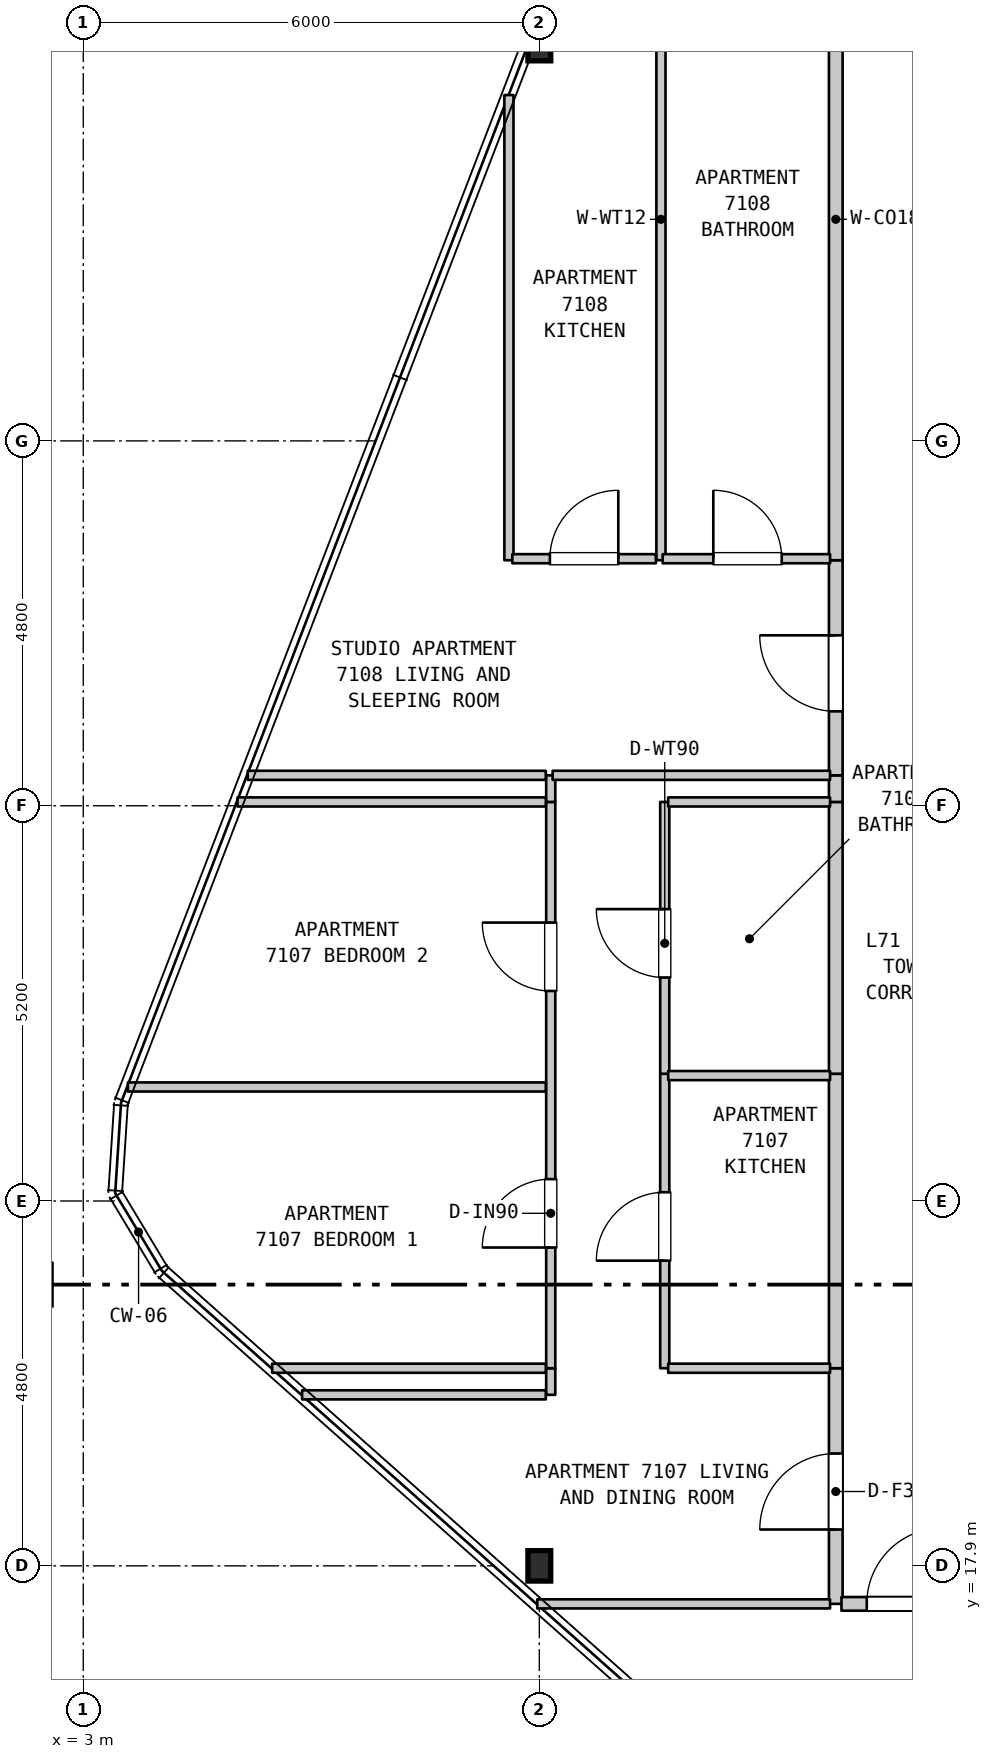
"""IFC4 building model, lengths in metres.
Left out: names, types, materials, properties, quantities, classifications, styles, units other than length and angle.
Written with IfcOpenShell. Run it as: python <this file> out.ifc"""

import sys

from ifc_helpers import new_model, si_unit, direction, frame, frame_2d, origin, origin_2d, place, context, subcontext, project, spatial, rectangle, i_section, extrude, element, fill, save


model = new_model("IFC4")
c1 = context("Model", 3, precision=1e-05, world=origin(), true_north=direction((0.0, 1.0)))
c2 = subcontext(c1, "Body", "Model", "MODEL_VIEW")
j1 = project(units=[si_unit("LENGTHUNIT", "METRE"), si_unit("PLANEANGLEUNIT", "RADIAN")], contexts=[c1])
p1 = place(None, origin())
s1 = spatial("IfcSite", under=j1, at=p1, CompositionType="ELEMENT")
p2 = place(p1, origin())
s2 = spatial("IfcBuilding", under=s1, at=p2, CompositionType="ELEMENT")
p3 = place(p2, frame((0.0, 0.0, 284.3)))
s3 = spatial("IfcBuildingStorey", under=s2, at=p3, CompositionType="ELEMENT", Elevation=284.3)
for number, where, z_axis, x_axis in (
    (1, (9.0, 17.9, 0.0), (0.0, 0.0, 1.0), (1.0, 0.0, 0.0)),
    (2, (9.0, 37.9, 0.0), (0.0, 0.0, 1.0), (1.0, 0.0, 0.0)),
):
    element("IfcColumn", number, at=place(p3, frame(where, z_axis=z_axis, x_axis=x_axis)), inside=s3, PredefinedType="COLUMN", context=c2, shape_type="SweptSolid", body=[
        extrude(i_section(OverallWidth=0.3, OverallDepth=0.4, WebThickness=0.013, FlangeThickness=0.024, FilletRadius=0.027, at=origin_2d()), origin(), (0.0, 0.0, 1.0), 3.7),
    ])
p4 = place(p3, frame((8.6, 31.13, 0.0), z_axis=(0.0, 0.0, 1.0), x_axis=(0.0, 1.0, 0.0)))
e3 = element("IfcWall", 3, at=p4, inside=s3, PredefinedType="PARTITIONING", context=c2, shape_type="SweptSolid", body=[
    extrude(rectangle(XDim=6.12, YDim=0.12, at=frame_2d((3.06, 0.0))), origin(), (0.0, 0.0, 1.0), 3.39),
])
p5 = place(p3, frame((9.15, 20.15, 0.0), z_axis=(0.0, 0.0, 1.0), x_axis=(0.0, 1.0, 0.0)))
e4 = element("IfcWall", 4, at=p5, inside=s3, PredefinedType="PARTITIONING", context=c2, shape_type="SweptSolid", body=[
    extrude(rectangle(XDim=0.35, YDim=0.12, at=frame_2d((0.175, 0.0))), origin(), (0.0, 0.0, 1.0), 3.39),
])
p6 = place(p3, frame((9.15, 20.5, 0.0), z_axis=(0.0, 0.0, 1.0), x_axis=(0.0, 1.0, 0.0)))
e5 = element("IfcWall", 5, at=p6, inside=s3, PredefinedType="PARTITIONING", context=c2, shape_type="SweptSolid", body=[
    extrude(rectangle(XDim=7.45, YDim=0.12, at=frame_2d((3.725, 0.0))), origin(), (0.0, 0.0, 1.0), 2.79),
])
p7 = place(p6, frame((1.588, 0.0, 0.0)))
e6 = element("IfcOpeningElement", 6, at=p7, cuts=e5, PredefinedType="OPENING", context=c2, shape_type="SweptSolid", body=[
    extrude(rectangle(XDim=0.9, YDim=2.15, at=frame_2d((0.45, 1.075))), frame((0.0, 0.07, 0.0), z_axis=(0.0, -1.0, 0.0), x_axis=(1.0, 0.0, 0.0)), (0.0, 0.0, 1.0), 0.14),
])
p8 = place(p6, frame((4.963, 0.0, 0.0)))
e7 = element("IfcOpeningElement", 7, at=p8, cuts=e5, PredefinedType="OPENING", context=c2, shape_type="SweptSolid", body=[
    extrude(rectangle(XDim=0.9, YDim=2.15, at=frame_2d((0.45, 1.075))), frame((0.0, 0.07, 0.0), z_axis=(0.0, -1.0, 0.0), x_axis=(1.0, 0.0, 0.0)), (0.0, 0.0, 1.0), 0.14),
])
p9 = place(p3, frame((9.15, 27.95, 0.0), z_axis=(0.0, 0.0, 1.0), x_axis=(0.0, 1.0, 0.0)))
e8 = element("IfcWall", 8, at=p9, inside=s3, PredefinedType="PARTITIONING", context=c2, shape_type="SweptSolid", body=[
    extrude(rectangle(XDim=0.35, YDim=0.12, at=frame_2d((0.175, 0.0))), origin(), (0.0, 0.0, 1.0), 3.39),
])
p10 = place(p3, frame((10.6, 31.13, 0.0), z_axis=(0.0, 0.0, 1.0), x_axis=(0.0, 1.0, 0.0)))
e9 = element("IfcWall", 9, at=p10, inside=s3, PredefinedType="PARTITIONING", context=c2, shape_type="SweptSolid", body=[
    extrude(rectangle(XDim=8.97, YDim=0.12, at=frame_2d((4.485, 0.0))), origin(), (0.0, 0.0, 1.0), 3.39),
])
p11 = place(p3, frame((10.65, 20.5, 0.0), z_axis=(0.0, 0.0, 1.0), x_axis=(0.0, 1.0, 0.0)))
e10 = element("IfcWall", 10, at=p11, inside=s3, PredefinedType="PARTITIONING", context=c2, shape_type="SweptSolid", body=[
    extrude(rectangle(XDim=3.874, YDim=0.12, at=frame_2d((1.937, 0.0))), origin(), (0.0, 0.0, 1.0), 3.39),
])
p12 = place(p11, frame((1.415, 0.0, 0.0)))
e11 = element("IfcOpeningElement", 11, at=p12, cuts=e10, PredefinedType="OPENING", context=c2, shape_type="SweptSolid", body=[
    extrude(rectangle(XDim=0.9, YDim=2.15, at=frame_2d((0.45, 1.075))), frame((0.0, 0.07, 0.0), z_axis=(0.0, -1.0, 0.0), x_axis=(1.0, 0.0, 0.0)), (0.0, 0.0, 1.0), 0.14),
])
p13 = place(p3, frame((10.65, 24.374, 0.0), z_axis=(0.0, 0.0, 1.0), x_axis=(0.0, 1.0, 0.0)))
e12 = element("IfcWall", 12, at=p13, inside=s3, PredefinedType="PARTITIONING", context=c2, shape_type="SweptSolid", body=[
    extrude(rectangle(XDim=3.576, YDim=0.12, at=frame_2d((1.788, 0.0))), origin(), (0.0, 0.0, 1.0), 3.39),
])
p14 = place(p13, frame((1.266, 0.0, 0.0)))
e13 = element("IfcOpeningElement", 13, at=p14, cuts=e12, PredefinedType="OPENING", context=c2, shape_type="SweptSolid", body=[
    extrude(rectangle(XDim=0.9, YDim=2.1, at=frame_2d((0.45, 1.05))), frame((0.0, 0.07, 0.0), z_axis=(0.0, -1.0, 0.0), x_axis=(1.0, 0.0, 0.0)), (0.0, 0.0, 1.0), 0.14),
])
p15 = place(p3, frame((12.9, 17.4, 0.0), z_axis=(0.0, 0.0, 1.0), x_axis=(0.0, 1.0, 0.0)))
e14 = element("IfcWall", 14, at=p15, inside=s3, PredefinedType="STANDARD", context=c2, shape_type="SweptSolid", body=[
    extrude(rectangle(XDim=3.1, YDim=0.18, at=frame_2d((1.55, 0.0))), origin(), (0.0, 0.0, 1.0), 3.39),
])
p16 = place(p15, frame((0.978, 0.0, 0.0)))
e15 = element("IfcOpeningElement", 15, at=p16, cuts=e14, PredefinedType="OPENING", context=c2, shape_type="SweptSolid", body=[
    extrude(rectangle(XDim=1.0, YDim=2.15, at=frame_2d((0.5, 1.075))), frame((0.0, 0.1, 0.0), z_axis=(0.0, -1.0, 0.0), x_axis=(1.0, 0.0, 0.0)), (0.0, 0.0, 1.0), 0.2),
])
p17 = place(p3, frame((12.9, 20.5, 0.0), z_axis=(0.0, 0.0, 1.0), x_axis=(0.0, 1.0, 0.0)))
e16 = element("IfcWall", 16, at=p17, inside=s3, PredefinedType="STANDARD", context=c2, shape_type="SweptSolid", body=[
    extrude(rectangle(XDim=3.874, YDim=0.18, at=frame_2d((1.937, 0.0))), origin(), (0.0, 0.0, 1.0), 3.39),
])
p18 = place(p3, frame((12.9, 24.374, 0.0), z_axis=(0.0, 0.0, 1.0), x_axis=(0.0, 1.0, 0.0)))
e17 = element("IfcWall", 17, at=p18, inside=s3, PredefinedType="STANDARD", context=c2, shape_type="SweptSolid", body=[
    extrude(rectangle(XDim=3.576, YDim=0.18, at=frame_2d((1.788, 0.0))), origin(), (0.0, 0.0, 1.0), 3.39),
])
p19 = place(p3, frame((12.9, 27.95, 0.0), z_axis=(0.0, 0.0, 1.0), x_axis=(0.0, 1.0, 0.0)))
e18 = element("IfcWall", 18, at=p19, inside=s3, PredefinedType="STANDARD", context=c2, shape_type="SweptSolid", body=[
    extrude(rectangle(XDim=0.35, YDim=0.18, at=frame_2d((0.175, 0.0))), origin(), (0.0, 0.0, 1.0), 3.39),
])
p20 = place(p3, frame((12.9, 28.3, 0.0), z_axis=(0.0, 0.0, 1.0), x_axis=(0.0, 1.0, 0.0)))
e19 = element("IfcWall", 19, at=p20, inside=s3, PredefinedType="STANDARD", context=c2, shape_type="SweptSolid", body=[
    extrude(rectangle(XDim=2.83, YDim=0.18, at=frame_2d((1.415, 0.0))), origin(), (0.0, 0.0, 1.0), 3.39),
])
p21 = place(p20, frame((0.842, 0.0, 0.0)))
e20 = element("IfcOpeningElement", 20, at=p21, cuts=e19, PredefinedType="OPENING", context=c2, shape_type="SweptSolid", body=[
    extrude(rectangle(XDim=1.0, YDim=2.15, at=frame_2d((0.5, 1.075))), frame((0.0, 0.1, 0.0), z_axis=(0.0, -1.0, 0.0), x_axis=(1.0, 0.0, 0.0)), (0.0, 0.0, 1.0), 0.2),
])
p22 = place(p3, frame((12.9, 31.13, 0.0), z_axis=(0.0, 0.0, 1.0), x_axis=(0.0, 1.0, 0.0)))
e21 = element("IfcWall", 21, at=p22, inside=s3, PredefinedType="STANDARD", context=c2, shape_type="SweptSolid", body=[
    extrude(rectangle(XDim=8.97, YDim=0.18, at=frame_2d((4.485, 0.0))), origin(), (0.0, 0.0, 1.0), 3.39),
])
p23 = place(p3, frame((8.973, 17.4, 0.0), z_axis=(0.0, 0.0, 1.0), x_axis=(1.0, 0.0, 0.0)))
e22 = element("IfcWall", 22, at=p23, inside=s3, PredefinedType="PARTITIONING", context=c2, shape_type="SweptSolid", body=[
    extrude(rectangle(XDim=3.852, YDim=0.12, at=frame_2d((1.926, 0.0))), origin(), (0.0, 0.0, 1.0), 3.39),
])
p24 = place(p3, frame((12.975, 17.4, 0.0), z_axis=(0.0, 0.0, 1.0), x_axis=(1.0, 0.0, 0.0)))
e23 = element("IfcWall", 23, at=p24, inside=s3, PredefinedType="STANDARD", context=c2, shape_type="SweptSolid", body=[
    extrude(rectangle(XDim=3.48, YDim=0.18, at=frame_2d((1.74, 0.0))), origin(), (0.0, 0.0, 1.0), 3.39),
])
p25 = place(p24, frame((0.333, 0.0, 0.0)))
e24 = element("IfcOpeningElement", 24, at=p25, cuts=e23, PredefinedType="OPENING", context=c2, shape_type="SweptSolid", body=[
    extrude(rectangle(XDim=1.0, YDim=2.15, at=frame_2d((0.5, 1.075))), frame((0.0, 0.1, 0.0), z_axis=(0.0, -1.0, 0.0), x_axis=(1.0, 0.0, 0.0)), (0.0, 0.0, 1.0), 0.2),
])
p26 = place(p3, frame((5.879, 20.15, 0.0), z_axis=(0.0, 0.0, 1.0), x_axis=(1.0, 0.0, 0.0)))
e25 = element("IfcWall", 25, at=p26, inside=s3, PredefinedType="PARTITIONING", context=c2, shape_type="SweptSolid", body=[
    extrude(rectangle(XDim=3.206, YDim=0.12, at=frame_2d((1.603, 0.0))), origin(), (0.0, 0.0, 1.0), 3.39),
])
p27 = place(p3, frame((5.485, 20.5, 0.0), z_axis=(0.0, 0.0, 1.0), x_axis=(1.0, 0.0, 0.0)))
e26 = element("IfcWall", 26, at=p27, inside=s3, PredefinedType="PARTITIONING", context=c2, shape_type="SweptSolid", body=[
    extrude(rectangle(XDim=3.6, YDim=0.12, at=frame_2d((1.8, 0.0))), origin(), (0.0, 0.0, 1.0), 3.39),
])
p28 = place(p3, frame((10.695, 20.5, 0.0), z_axis=(0.0, 0.0, 1.0), x_axis=(1.0, 0.0, 0.0)))
e27 = element("IfcWall", 27, at=p28, inside=s3, PredefinedType="PARTITIONING", context=c2, shape_type="SweptSolid", body=[
    extrude(rectangle(XDim=2.13, YDim=0.12, at=frame_2d((1.065, 0.0))), origin(), (0.0, 0.0, 1.0), 3.39),
])
p29 = place(p3, frame((3.587, 24.2, 0.0), z_axis=(0.0, 0.0, 1.0), x_axis=(1.0, 0.0, 0.0)))
e28 = element("IfcWall", 28, at=p29, inside=s3, PredefinedType="PARTITIONING", context=c2, shape_type="SweptSolid", body=[
    extrude(rectangle(XDim=5.498, YDim=0.12, at=frame_2d((2.749, 0.0))), origin(), (0.0, 0.0, 1.0), 3.39),
])
p30 = place(p3, frame((10.695, 24.35, 0.0), z_axis=(0.0, 0.0, 1.0), x_axis=(1.0, 0.0, 0.0)))
e29 = element("IfcWall", 29, at=p30, inside=s3, PredefinedType="PARTITIONING", context=c2, shape_type="SweptSolid", body=[
    extrude(rectangle(XDim=2.13, YDim=0.12, at=frame_2d((1.065, 0.0))), origin(), (0.0, 0.0, 1.0), 3.39),
])
p31 = place(p3, frame((5.029, 27.95, 0.0), z_axis=(0.0, 0.0, 1.0), x_axis=(1.0, 0.0, 0.0)))
e30 = element("IfcWall", 30, at=p31, inside=s3, PredefinedType="PARTITIONING", context=c2, shape_type="SweptSolid", body=[
    extrude(rectangle(XDim=4.056, YDim=0.12, at=frame_2d((2.028, 0.0))), origin(), (0.0, 0.0, 1.0), 3.39),
])
p32 = place(p3, frame((10.695, 27.95, 0.0), z_axis=(0.0, 0.0, 1.0), x_axis=(1.0, 0.0, 0.0)))
e31 = element("IfcWall", 31, at=p32, inside=s3, PredefinedType="PARTITIONING", context=c2, shape_type="SweptSolid", body=[
    extrude(rectangle(XDim=2.13, YDim=0.12, at=frame_2d((1.065, 0.0))), origin(), (0.0, 0.0, 1.0), 3.39),
])
p33 = place(p3, frame((5.164, 28.3, 0.0), z_axis=(0.0, 0.0, 1.0), x_axis=(1.0, 0.0, 0.0)))
e32 = element("IfcWall", 32, at=p33, inside=s3, PredefinedType="PARTITIONING", context=c2, shape_type="SweptSolid", body=[
    extrude(rectangle(XDim=3.921, YDim=0.12, at=frame_2d((1.96, 0.0))), origin(), (0.0, 0.0, 1.0), 3.39),
])
p34 = place(p3, frame((9.175, 28.3, 0.0), z_axis=(0.0, 0.0, 1.0), x_axis=(1.0, 0.0, 0.0)))
e33 = element("IfcWall", 33, at=p34, inside=s3, PredefinedType="PARTITIONING", context=c2, shape_type="SweptSolid", body=[
    extrude(rectangle(XDim=3.65, YDim=0.12, at=frame_2d((1.825, 0.0))), origin(), (0.0, 0.0, 1.0), 3.39),
])
p35 = place(p3, frame((8.645, 31.15, 0.0), z_axis=(0.0, 0.0, 1.0), x_axis=(1.0, 0.0, 0.0)))
e34 = element("IfcWall", 34, at=p35, inside=s3, PredefinedType="PARTITIONING", context=c2, shape_type="SweptSolid", body=[
    extrude(rectangle(XDim=1.888, YDim=0.12, at=frame_2d((0.944, 0.0))), origin(), (0.0, 0.0, 1.0), 3.39),
])
p36 = place(p35, frame((0.494, 0.0, 0.0)))
e35 = element("IfcOpeningElement", 35, at=p36, cuts=e34, PredefinedType="OPENING", context=c2, shape_type="SweptSolid", body=[
    extrude(rectangle(XDim=0.9, YDim=2.15, at=frame_2d((0.45, 1.075))), frame((0.0, 0.07, 0.0), z_axis=(0.0, -1.0, 0.0), x_axis=(1.0, 0.0, 0.0)), (0.0, 0.0, 1.0), 0.14),
])
p37 = place(p3, frame((10.623, 31.15, 0.0), z_axis=(0.0, 0.0, 1.0), x_axis=(1.0, 0.0, 0.0)))
e36 = element("IfcWall", 36, at=p37, inside=s3, PredefinedType="PARTITIONING", context=c2, shape_type="SweptSolid", body=[
    extrude(rectangle(XDim=2.202, YDim=0.12, at=frame_2d((1.101, 0.0))), origin(), (0.0, 0.0, 1.0), 3.39),
])
p38 = place(p37, frame((0.666, 0.0, 0.0)))
e37 = element("IfcOpeningElement", 37, at=p38, cuts=e36, PredefinedType="OPENING", context=c2, shape_type="SweptSolid", body=[
    extrude(rectangle(XDim=0.9, YDim=2.1, at=frame_2d((0.45, 1.05))), frame((0.0, 0.07, 0.0), z_axis=(0.0, -1.0, 0.0), x_axis=(1.0, 0.0, 0.0)), (0.0, 0.0, 1.0), 0.14),
])
p39 = place(p7, origin())
e38 = element("IfcDoor", 38, at=p39, inside=s3, OperationType="SINGLE_SWING_LEFT", PredefinedType="DOOR", context=c2, shape_type="SweptSolid", body=[
    extrude(rectangle(XDim=0.9, YDim=2.15, at=frame_2d((0.45, 1.075))), frame((0.0, 0.025, 0.0), z_axis=(0.0, -1.0, 0.0), x_axis=(1.0, 0.0, 0.0)), (0.0, 0.0, 1.0), 0.05),
])
fill(e6, e38)
p40 = place(p8, origin())
e39 = element("IfcDoor", 39, at=p40, inside=s3, OperationType="SINGLE_SWING_RIGHT", PredefinedType="DOOR", context=c2, shape_type="SweptSolid", body=[
    extrude(rectangle(XDim=0.9, YDim=2.15, at=frame_2d((0.45, 1.075))), frame((0.0, 0.025, 0.0), z_axis=(0.0, -1.0, 0.0), x_axis=(1.0, 0.0, 0.0)), (0.0, 0.0, 1.0), 0.05),
])
fill(e7, e39)
p41 = place(p12, origin())
e40 = element("IfcDoor", 40, at=p41, inside=s3, OperationType="SINGLE_SWING_LEFT", PredefinedType="DOOR", context=c2, shape_type="SweptSolid", body=[
    extrude(rectangle(XDim=0.9, YDim=2.15, at=frame_2d((0.45, 1.075))), frame((0.0, 0.025, 0.0), z_axis=(0.0, -1.0, 0.0), x_axis=(1.0, 0.0, 0.0)), (0.0, 0.0, 1.0), 0.05),
])
fill(e11, e40)
p42 = place(p14, origin())
e41 = element("IfcDoor", 41, at=p42, inside=s3, OperationType="SINGLE_SWING_RIGHT", PredefinedType="DOOR", context=c2, shape_type="SweptSolid", body=[
    extrude(rectangle(XDim=0.9, YDim=2.1, at=frame_2d((0.45, 1.05))), frame((0.0, 0.025, 0.0), z_axis=(0.0, -1.0, 0.0), x_axis=(1.0, 0.0, 0.0)), (0.0, 0.0, 1.0), 0.05),
])
fill(e13, e41)
p43 = place(p16, origin())
e42 = element("IfcDoor", 42, at=p43, inside=s3, OperationType="SINGLE_SWING_LEFT", PredefinedType="DOOR", context=c2, shape_type="SweptSolid", body=[
    extrude(rectangle(XDim=1.0, YDim=2.15, at=frame_2d((0.5, 1.075))), frame((0.0, 0.025, 0.0), z_axis=(0.0, -1.0, 0.0), x_axis=(1.0, 0.0, 0.0)), (0.0, 0.0, 1.0), 0.05),
])
fill(e15, e42)
p44 = place(p21, origin())
e43 = element("IfcDoor", 43, at=p44, inside=s3, OperationType="SINGLE_SWING_RIGHT", PredefinedType="DOOR", context=c2, shape_type="SweptSolid", body=[
    extrude(rectangle(XDim=1.0, YDim=2.15, at=frame_2d((0.5, 1.075))), frame((0.0, 0.025, 0.0), z_axis=(0.0, -1.0, 0.0), x_axis=(1.0, 0.0, 0.0)), (0.0, 0.0, 1.0), 0.05),
])
fill(e20, e43)
p45 = place(p25, origin())
e44 = element("IfcDoor", 44, at=p45, inside=s3, OperationType="SINGLE_SWING_RIGHT", PredefinedType="DOOR", context=c2, shape_type="SweptSolid", body=[
    extrude(rectangle(XDim=1.0, YDim=2.15, at=frame_2d((0.5, 1.075))), frame((0.0, 0.025, 0.0), z_axis=(0.0, -1.0, 0.0), x_axis=(1.0, 0.0, 0.0)), (0.0, 0.0, 1.0), 0.05),
])
fill(e24, e44)
p46 = place(p36, origin())
e45 = element("IfcDoor", 45, at=p46, inside=s3, OperationType="SINGLE_SWING_RIGHT", PredefinedType="DOOR", context=c2, shape_type="SweptSolid", body=[
    extrude(rectangle(XDim=0.9, YDim=2.15, at=frame_2d((0.45, 1.075))), frame((0.0, 0.025, 0.0), z_axis=(0.0, -1.0, 0.0), x_axis=(1.0, 0.0, 0.0)), (0.0, 0.0, 1.0), 0.05),
])
fill(e35, e45)
p47 = place(p38, origin())
e46 = element("IfcDoor", 46, at=p47, inside=s3, OperationType="SINGLE_SWING_LEFT", PredefinedType="DOOR", context=c2, shape_type="SweptSolid", body=[
    extrude(rectangle(XDim=0.9, YDim=2.1, at=frame_2d((0.45, 1.05))), frame((0.0, 0.025, 0.0), z_axis=(0.0, -1.0, 0.0), x_axis=(1.0, 0.0, 0.0)), (0.0, 0.0, 1.0), 0.05),
])
fill(e37, e46)
save(model, sys.argv[1])
